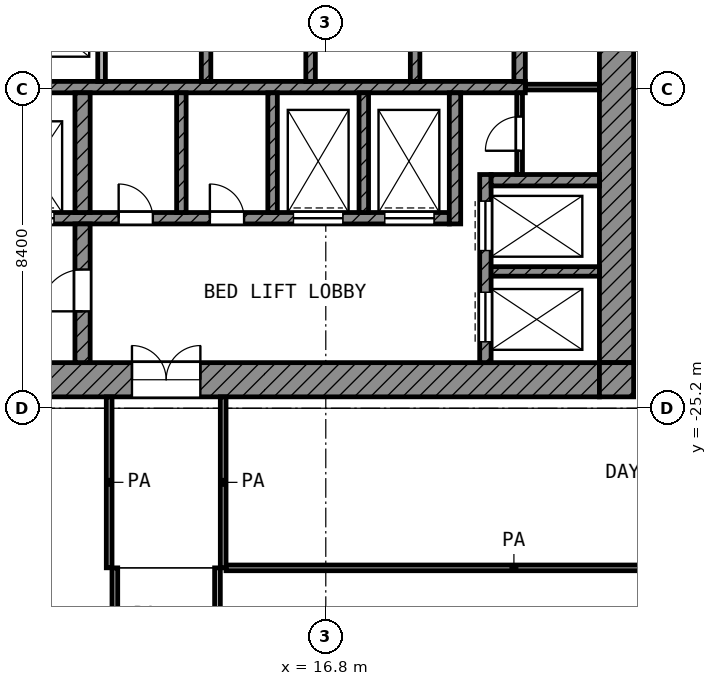
"""IFC4 building model, lengths in metres.
Left out: names, types, materials, properties, quantities, classifications, styles, units other than length and angle.
Written with IfcOpenShell. Run it as: python <this file> out.ifc"""

import sys

from ifc_helpers import new_model, si_unit, direction, frame, frame_2d, origin, place, context, subcontext, project, spatial, rectangle, extrude, element, fill, save


model = new_model("IFC4")
c1 = context("Model", 3, precision=1e-05, world=origin(), true_north=direction((0.0, 1.0)))
c2 = subcontext(c1, "Body", "Model", "MODEL_VIEW")
j1 = project(units=[si_unit("LENGTHUNIT", "METRE"), si_unit("PLANEANGLEUNIT", "RADIAN")], contexts=[c1])
p1 = place(None, origin())
s1 = spatial("IfcSite", under=j1, at=p1, CompositionType="ELEMENT")
p2 = place(p1, origin())
s2 = spatial("IfcBuilding", under=s1, at=p2, CompositionType="ELEMENT")
p3 = place(p2, frame((0.0, 0.0, 196.2)))
s3 = spatial("IfcBuildingStorey", under=s2, at=p3, CompositionType="ELEMENT", Elevation=196.2)
p4 = place(p3, frame((24.45, -24.0, 0.0), z_axis=(0.0, 0.0, 1.0), x_axis=(0.0, 1.0, 0.0)))
e1 = element("IfcWall", 1, at=p4, inside=s3, PredefinedType="SHEAR", context=c2, shape_type="SweptSolid", body=[
    extrude(rectangle(XDim=18.6, YDim=0.9, at=frame_2d((9.3, 0.0))), origin(), (0.0, 0.0, 1.0), 3.6),
])
p5 = place(p4, frame((10.5, 0.0, 0.0)))
e2 = element("IfcOpeningElement", 2, at=p5, cuts=e1, PredefinedType="OPENING", context=c2, shape_type="SweptSolid", body=[
    extrude(rectangle(XDim=1.8, YDim=2.1, at=frame_2d((0.9, 1.05))), frame((0.0, 0.46, 0.0), z_axis=(0.0, -1.0, 0.0), x_axis=(1.0, 0.0, 0.0)), (0.0, 0.0, 1.0), 0.92),
])
p6 = place(p3, frame((5.4, -24.45, 0.0), z_axis=(0.0, 0.0, 1.0), x_axis=(1.0, 0.0, 0.0)))
e3 = element("IfcWall", 3, at=p6, inside=s3, PredefinedType="SHEAR", context=c2, shape_type="SweptSolid", body=[
    extrude(rectangle(XDim=18.6, YDim=0.9, at=frame_2d((9.3, 0.0))), origin(), (0.0, 0.0, 1.0), 3.6),
])
p7 = place(p6, frame((6.3, 0.0, 0.0)))
e4 = element("IfcOpeningElement", 4, at=p7, cuts=e3, PredefinedType="OPENING", context=c2, shape_type="SweptSolid", body=[
    extrude(rectangle(XDim=1.8, YDim=2.1, at=frame_2d((0.9, 1.05))), frame((0.0, 0.46, 0.0), z_axis=(0.0, -1.0, 0.0), x_axis=(1.0, 0.0, 0.0)), (0.0, 0.0, 1.0), 0.92),
])
p8 = place(p3, frame((24.45, -24.9, 0.0), z_axis=(0.0, 0.0, 1.0), x_axis=(0.0, 1.0, 0.0)))
e5 = element("IfcWall", 5, at=p8, inside=s3, PredefinedType="SHEAR", context=c2, shape_type="SweptSolid", body=[
    extrude(rectangle(XDim=0.9, YDim=0.9, at=frame_2d((0.45, 0.0))), origin(), (0.0, 0.0, 1.0), 3.6),
])
p9 = place(p3, frame((5.4, -16.75, 0.0), z_axis=(0.0, 0.0, 1.0), x_axis=(1.0, 0.0, 0.0)))
e6 = element("IfcWall", 6, at=p9, inside=s3, PredefinedType="SHEAR", context=c2, shape_type="SweptSolid", body=[
    extrude(rectangle(XDim=16.65, YDim=0.3, at=frame_2d((8.325, 0.0))), origin(), (0.0, 0.0, 1.0), 3.6),
])
p10 = place(p3, frame((5.4, -20.2, 0.0), z_axis=(0.0, 0.0, 1.0), x_axis=(1.0, 0.0, 0.0)))
e7 = element("IfcWall", 7, at=p10, inside=s3, PredefinedType="SHEAR", context=c2, shape_type="SweptSolid", body=[
    extrude(rectangle(XDim=14.65, YDim=0.3, at=frame_2d((7.325, 0.0))), origin(), (0.0, 0.0, 1.0), 3.6),
])
p11 = place(p10, frame((10.55, 0.0, 0.0)))
e8 = element("IfcOpeningElement", 8, at=p11, cuts=e7, PredefinedType="OPENING", context=c2, shape_type="SweptSolid", body=[
    extrude(rectangle(XDim=1.3, YDim=2.1, at=frame_2d((0.65, 1.05))), frame((0.0, 0.16, 0.0), z_axis=(0.0, -1.0, 0.0), x_axis=(1.0, 0.0, 0.0)), (0.0, 0.0, 1.0), 0.32),
])
p12 = place(p10, frame((12.95, 0.0, 0.0)))
e9 = element("IfcOpeningElement", 9, at=p12, cuts=e7, PredefinedType="OPENING", context=c2, shape_type="SweptSolid", body=[
    extrude(rectangle(XDim=1.3, YDim=2.1, at=frame_2d((0.65, 1.05))), frame((0.0, 0.16, 0.0), z_axis=(0.0, -1.0, 0.0), x_axis=(1.0, 0.0, 0.0)), (0.0, 0.0, 1.0), 0.32),
])
p13 = place(p10, frame((0.55, 0.0, 0.0)))
e10 = element("IfcOpeningElement", 10, at=p13, cuts=e7, PredefinedType="OPENING", context=c2, shape_type="SweptSolid", body=[
    extrude(rectangle(XDim=1.3, YDim=2.1, at=frame_2d((0.65, 1.05))), frame((0.0, 0.16, 0.0), z_axis=(0.0, -1.0, 0.0), x_axis=(1.0, 0.0, 0.0)), (0.0, 0.0, 1.0), 0.32),
])
p14 = place(p10, frame((2.95, 0.0, 0.0)))
e11 = element("IfcOpeningElement", 11, at=p14, cuts=e7, PredefinedType="OPENING", context=c2, shape_type="SweptSolid", body=[
    extrude(rectangle(XDim=1.3, YDim=2.1, at=frame_2d((0.65, 1.05))), frame((0.0, 0.16, 0.0), z_axis=(0.0, -1.0, 0.0), x_axis=(1.0, 0.0, 0.0)), (0.0, 0.0, 1.0), 0.32),
])
p15 = place(p10, frame((5.95, 0.0, 0.0)))
e12 = element("IfcOpeningElement", 12, at=p15, cuts=e7, PredefinedType="OPENING", context=c2, shape_type="SweptSolid", body=[
    extrude(rectangle(XDim=0.9, YDim=2.1, at=frame_2d((0.45, 1.05))), frame((0.0, 0.16, 0.0), z_axis=(0.0, -1.0, 0.0), x_axis=(1.0, 0.0, 0.0)), (0.0, 0.0, 1.0), 0.32),
])
p16 = place(p10, frame((8.35, 0.0, 0.0)))
e13 = element("IfcOpeningElement", 13, at=p16, cuts=e7, PredefinedType="OPENING", context=c2, shape_type="SweptSolid", body=[
    extrude(rectangle(XDim=0.9, YDim=2.1, at=frame_2d((0.45, 1.05))), frame((0.0, 0.16, 0.0), z_axis=(0.0, -1.0, 0.0), x_axis=(1.0, 0.0, 0.0)), (0.0, 0.0, 1.0), 0.32),
])
p17 = place(p3, frame((10.4, -24.0, 0.0), z_axis=(0.0, 0.0, 1.0), x_axis=(0.0, 1.0, 0.0)))
e14 = element("IfcWall", 14, at=p17, inside=s3, PredefinedType="SHEAR", context=c2, shape_type="SweptSolid", body=[
    extrude(rectangle(XDim=3.65, YDim=0.4, at=frame_2d((1.825, 0.0))), origin(), (0.0, 0.0, 1.0), 3.6),
])
p18 = place(p17, frame((1.35, 0.0, 0.0)))
e15 = element("IfcOpeningElement", 15, at=p18, cuts=e14, PredefinedType="OPENING", context=c2, shape_type="SweptSolid", body=[
    extrude(rectangle(XDim=1.1, YDim=2.1, at=frame_2d((0.55, 1.05))), frame((0.0, 0.21, 0.0), z_axis=(0.0, -1.0, 0.0), x_axis=(1.0, 0.0, 0.0)), (0.0, 0.0, 1.0), 0.42),
])
p19 = place(p3, frame((10.4, -20.05, 0.0), z_axis=(0.0, 0.0, 1.0), x_axis=(0.0, 1.0, 0.0)))
e16 = element("IfcWall", 16, at=p19, inside=s3, PredefinedType="SHEAR", context=c2, shape_type="SweptSolid", body=[
    extrude(rectangle(XDim=3.15, YDim=0.4, at=frame_2d((1.575, 0.0))), origin(), (0.0, 0.0, 1.0), 3.6),
])
p20 = place(p3, frame((20.2, -20.35, 0.0), z_axis=(0.0, 0.0, 1.0), x_axis=(0.0, 1.0, 0.0)))
e17 = element("IfcWall", 17, at=p20, inside=s3, PredefinedType="SHEAR", context=c2, shape_type="SweptSolid", body=[
    extrude(rectangle(XDim=3.45, YDim=0.3, at=frame_2d((1.725, 0.0))), origin(), (0.0, 0.0, 1.0), 3.6),
])
p21 = place(p3, frame((21.9, -16.6, 0.0), z_axis=(0.0, 0.0, 1.0), x_axis=(0.0, 1.0, 0.0)))
e18 = element("IfcWall", 18, at=p21, inside=s3, PredefinedType="SHEAR", context=c2, shape_type="SweptSolid", body=[
    extrude(rectangle(XDim=2.35, YDim=0.3, at=frame_2d((1.175, 0.0))), origin(), (0.0, 0.0, 1.0), 3.6),
])
p22 = place(p3, frame((21.15, -19.2, 0.0), z_axis=(0.0, 0.0, 1.0), x_axis=(1.0, 0.0, 0.0)))
e19 = element("IfcWall", 19, at=p22, inside=s3, PredefinedType="SHEAR", context=c2, shape_type="SweptSolid", body=[
    extrude(rectangle(XDim=2.85, YDim=0.3, at=frame_2d((1.425, 0.0))), origin(), (0.0, 0.0, 1.0), 3.6),
])
p23 = place(p3, frame((21.0, -24.0, 0.0), z_axis=(0.0, 0.0, 1.0), x_axis=(0.0, 1.0, 0.0)))
e20 = element("IfcWall", 20, at=p23, inside=s3, PredefinedType="SHEAR", context=c2, shape_type="SweptSolid", body=[
    extrude(rectangle(XDim=4.95, YDim=0.3, at=frame_2d((2.475, 0.0))), origin(), (0.0, 0.0, 1.0), 3.6),
])
p24 = place(p23, frame((2.95, 0.0, 0.0)))
e21 = element("IfcOpeningElement", 21, at=p24, cuts=e20, PredefinedType="OPENING", context=c2, shape_type="SweptSolid", body=[
    extrude(rectangle(XDim=1.3, YDim=2.1, at=frame_2d((0.65, 1.05))), frame((0.0, 0.16, 0.0), z_axis=(0.0, -1.0, 0.0), x_axis=(1.0, 0.0, 0.0)), (0.0, 0.0, 1.0), 0.32),
])
p25 = place(p23, frame((0.55, 0.0, 0.0)))
e22 = element("IfcOpeningElement", 22, at=p25, cuts=e20, PredefinedType="OPENING", context=c2, shape_type="SweptSolid", body=[
    extrude(rectangle(XDim=1.3, YDim=2.1, at=frame_2d((0.65, 1.05))), frame((0.0, 0.16, 0.0), z_axis=(0.0, -1.0, 0.0), x_axis=(1.0, 0.0, 0.0)), (0.0, 0.0, 1.0), 0.32),
])
p26 = place(p3, frame((21.15, -21.6, 0.0), z_axis=(0.0, 0.0, 1.0), x_axis=(1.0, 0.0, 0.0)))
e23 = element("IfcWall", 23, at=p26, inside=s3, PredefinedType="SHEAR", context=c2, shape_type="SweptSolid", body=[
    extrude(rectangle(XDim=2.85, YDim=0.25, at=frame_2d((1.425, 0.0))), origin(), (0.0, 0.0, 1.0), 3.6),
])
for number, where, z_axis, x_axis in (
    (24, (13.0, -20.05, 0.0), (0.0, 0.0, 1.0), (0.0, 1.0, 0.0)),
    (25, (15.4, -20.05, 0.0), (0.0, 0.0, 1.0), (0.0, 1.0, 0.0)),
    (26, (17.8, -20.05, 0.0), (0.0, 0.0, 1.0), (0.0, 1.0, 0.0)),
):
    element("IfcWall", number, at=place(p3, frame(where, z_axis=z_axis, x_axis=x_axis)), inside=s3, PredefinedType="SHEAR", context=c2, shape_type="SweptSolid", body=[
        extrude(rectangle(XDim=3.15, YDim=0.25, at=frame_2d((1.575, 0.0))), origin(), (0.0, 0.0, 1.0), 3.6),
    ])
p27 = place(p3, frame((10.9, -16.6, 0.0), z_axis=(0.0, 0.0, 1.0), x_axis=(0.0, 1.0, 0.0)))
e27 = element("IfcWall", 27, at=p27, inside=s3, PredefinedType="PARTITIONING", context=c2, shape_type="SweptSolid", body=[
    extrude(rectangle(XDim=2.35, YDim=0.2, at=frame_2d((1.175, 0.0))), origin(), (0.0, 0.0, 1.0), 3.6),
])
for number, where, z_axis, x_axis in (
    (28, (13.65, -16.6, 0.0), (0.0, 0.0, 1.0), (0.0, 1.0, 0.0)),
    (29, (16.4, -16.6, 0.0), (0.0, 0.0, 1.0), (0.0, 1.0, 0.0)),
    (30, (19.15, -16.6, 0.0), (0.0, 0.0, 1.0), (0.0, 1.0, 0.0)),
):
    element("IfcWall", number, at=place(p3, frame(where, z_axis=z_axis, x_axis=x_axis)), inside=s3, PredefinedType="SHEAR", context=c2, shape_type="SweptSolid", body=[
        extrude(rectangle(XDim=2.35, YDim=0.25, at=frame_2d((1.175, 0.0))), origin(), (0.0, 0.0, 1.0), 3.6),
    ])
p28 = place(p3, frame((21.9, -19.05, 0.0), z_axis=(0.0, 0.0, 1.0), x_axis=(0.0, 1.0, 0.0)))
e31 = element("IfcWall", 31, at=p28, inside=s3, PredefinedType="PARTITIONING", context=c2, shape_type="SweptSolid", body=[
    extrude(rectangle(XDim=2.15, YDim=0.15, at=frame_2d((1.075, 0.0))), origin(), (0.0, 0.0, 1.0), 3.6),
])
p29 = place(p28, frame((0.625, 0.0, 0.0)))
e32 = element("IfcOpeningElement", 32, at=p29, cuts=e31, PredefinedType="OPENING", context=c2, shape_type="SweptSolid", body=[
    extrude(rectangle(XDim=0.9, YDim=2.1, at=frame_2d((0.45, 1.05))), frame((0.0, 0.085, 0.0), z_axis=(0.0, -1.0, 0.0), x_axis=(1.0, 0.0, 0.0)), (0.0, 0.0, 1.0), 0.17),
])
p30 = place(p3, frame((22.05, -16.75, 0.0), z_axis=(0.0, 0.0, 1.0), x_axis=(1.0, 0.0, 0.0)))
e33 = element("IfcWall", 33, at=p30, inside=s3, PredefinedType="PARTITIONING", context=c2, shape_type="SweptSolid", body=[
    extrude(rectangle(XDim=1.95, YDim=0.15, at=frame_2d((0.975, 0.0))), origin(), (0.0, 0.0, 1.0), 3.6),
])
p31 = place(p3, frame((14.175, -29.4, 0.0), z_axis=(0.0, 0.0, 1.0), x_axis=(1.0, 0.0, 0.0)))
e34 = element("IfcWall", 34, at=p31, inside=s3, PredefinedType="PARTITIONING", context=c2, shape_type="SweptSolid", body=[
    extrude(rectangle(XDim=15.15, YDim=0.15, at=frame_2d((7.575, 0.0))), origin(), (0.0, 0.0, 1.0), 3.6),
])
p32 = place(p3, frame((11.1, -29.398, 0.0), z_axis=(0.0, 0.0, 1.0), x_axis=(0.0, 1.0, 0.0)))
e35 = element("IfcWall", 35, at=p32, inside=s3, PredefinedType="PARTITIONING", context=c2, shape_type="SweptSolid", body=[
    extrude(rectangle(XDim=4.498, YDim=0.15, at=frame_2d((2.249, 0.0))), origin(), (0.0, 0.0, 1.0), 3.6),
])
p33 = place(p3, frame((11.25, -31.857, 0.0), z_axis=(0.0, 0.0, 1.0), x_axis=(0.0, 1.0, 0.0)))
e36 = element("IfcWall", 36, at=p33, inside=s3, PredefinedType="PARTITIONING", context=c2, shape_type="SweptSolid", body=[
    extrude(rectangle(XDim=2.457, YDim=0.15, at=frame_2d((1.229, 0.0))), origin(), (0.0, 0.0, 1.0), 3.6),
])
p34 = place(p3, frame((13.95, -54.52, 0.0), z_axis=(0.0, 0.0, 1.0), x_axis=(0.0, 1.0, 0.0)))
e37 = element("IfcWall", 37, at=p34, inside=s3, PredefinedType="PARTITIONING", context=c2, shape_type="SweptSolid", body=[
    extrude(rectangle(XDim=25.12, YDim=0.15, at=frame_2d((12.56, 0.0))), origin(), (0.0, 0.0, 1.0), 3.6),
])
p35 = place(p34, frame((20.17, 0.0, 0.0)))
e38 = element("IfcOpeningElement", 38, at=p35, cuts=e37, PredefinedType="OPENING", context=c2, shape_type="SweptSolid", body=[
    extrude(rectangle(XDim=1.2, YDim=2.1, at=frame_2d((0.6, 1.05))), frame((0.0, 0.085, 0.0), z_axis=(0.0, -1.0, 0.0), x_axis=(1.0, 0.0, 0.0)), (0.0, 0.0, 1.0), 0.17),
])
p36 = place(p34, frame((13.97, 0.0, 0.0)))
e39 = element("IfcOpeningElement", 39, at=p36, cuts=e37, PredefinedType="OPENING", context=c2, shape_type="SweptSolid", body=[
    extrude(rectangle(XDim=1.0, YDim=2.1, at=frame_2d((0.5, 1.05))), frame((0.0, 0.085, 0.0), z_axis=(0.0, -1.0, 0.0), x_axis=(1.0, 0.0, 0.0)), (0.0, 0.0, 1.0), 0.17),
])
p37 = place(p34, frame((11.22, 0.0, 0.0)))
e40 = element("IfcOpeningElement", 40, at=p37, cuts=e37, PredefinedType="OPENING", context=c2, shape_type="SweptSolid", body=[
    extrude(rectangle(XDim=1.1, YDim=2.1, at=frame_2d((0.55, 1.05))), frame((0.0, 0.085, 0.0), z_axis=(0.0, -1.0, 0.0), x_axis=(1.0, 0.0, 0.0)), (0.0, 0.0, 1.0), 0.17),
])
p38 = place(p34, frame((3.67, 0.0, 0.0)))
e41 = element("IfcOpeningElement", 41, at=p38, cuts=e37, PredefinedType="OPENING", context=c2, shape_type="SweptSolid", body=[
    extrude(rectangle(XDim=1.5, YDim=2.1, at=frame_2d((0.75, 1.05))), frame((0.0, 0.085, 0.0), z_axis=(0.0, -1.0, 0.0), x_axis=(1.0, 0.0, 0.0)), (0.0, 0.0, 1.0), 0.17),
])
p39 = place(p3, frame((14.1, -29.4, 0.0), z_axis=(0.0, 0.0, 1.0), x_axis=(0.0, 1.0, 0.0)))
e42 = element("IfcWall", 42, at=p39, inside=s3, PredefinedType="PARTITIONING", context=c2, shape_type="SweptSolid", body=[
    extrude(rectangle(XDim=4.5, YDim=0.15, at=frame_2d((2.25, 0.0))), origin(), (0.0, 0.0, 1.0), 3.6),
])
p40 = place(p24, origin())
e43 = element("IfcDoor", 43, at=p40, inside=s3, OperationType="DOUBLE_DOOR_SLIDING", PredefinedType="DOOR", context=c2, shape_type="SweptSolid", body=[
    extrude(rectangle(XDim=1.3, YDim=2.1, at=frame_2d((0.65, 1.05))), frame((0.0, 0.025, 0.0), z_axis=(0.0, -1.0, 0.0), x_axis=(1.0, 0.0, 0.0)), (0.0, 0.0, 1.0), 0.05),
])
fill(e21, e43)
p41 = place(p25, origin())
e44 = element("IfcDoor", 44, at=p41, inside=s3, OperationType="DOUBLE_DOOR_SLIDING", PredefinedType="DOOR", context=c2, shape_type="SweptSolid", body=[
    extrude(rectangle(XDim=1.3, YDim=2.1, at=frame_2d((0.65, 1.05))), frame((0.0, 0.025, 0.0), z_axis=(0.0, -1.0, 0.0), x_axis=(1.0, 0.0, 0.0)), (0.0, 0.0, 1.0), 0.05),
])
fill(e22, e44)
p42 = place(p11, origin())
e45 = element("IfcDoor", 45, at=p42, inside=s3, OperationType="DOUBLE_DOOR_SLIDING", PredefinedType="DOOR", context=c2, shape_type="SweptSolid", body=[
    extrude(rectangle(XDim=1.3, YDim=2.1, at=frame_2d((0.65, 1.05))), frame((0.0, 0.025, 0.0), z_axis=(0.0, -1.0, 0.0), x_axis=(1.0, 0.0, 0.0)), (0.0, 0.0, 1.0), 0.05),
])
fill(e8, e45)
p43 = place(p12, origin())
e46 = element("IfcDoor", 46, at=p43, inside=s3, OperationType="DOUBLE_DOOR_SLIDING", PredefinedType="DOOR", context=c2, shape_type="SweptSolid", body=[
    extrude(rectangle(XDim=1.3, YDim=2.1, at=frame_2d((0.65, 1.05))), frame((0.0, 0.025, 0.0), z_axis=(0.0, -1.0, 0.0), x_axis=(1.0, 0.0, 0.0)), (0.0, 0.0, 1.0), 0.05),
])
fill(e9, e46)
p44 = place(p14, origin())
e47 = element("IfcDoor", 47, at=p44, inside=s3, OperationType="DOUBLE_DOOR_SLIDING", PredefinedType="DOOR", context=c2, shape_type="SweptSolid", body=[
    extrude(rectangle(XDim=1.3, YDim=2.1, at=frame_2d((0.65, 1.05))), frame((0.0, 0.025, 0.0), z_axis=(0.0, -1.0, 0.0), x_axis=(1.0, 0.0, 0.0)), (0.0, 0.0, 1.0), 0.05),
])
fill(e11, e47)
p45 = place(p18, origin())
e48 = element("IfcDoor", 48, at=p45, inside=s3, OperationType="SINGLE_SWING_LEFT", PredefinedType="DOOR", context=c2, shape_type="SweptSolid", body=[
    extrude(rectangle(XDim=1.1, YDim=2.1, at=frame_2d((0.55, 1.05))), frame((0.0, 0.025, 0.0), z_axis=(0.0, -1.0, 0.0), x_axis=(1.0, 0.0, 0.0)), (0.0, 0.0, 1.0), 0.05),
])
fill(e15, e48)
p46 = place(p7, origin())
e49 = element("IfcDoor", 49, at=p46, inside=s3, OperationType="DOUBLE_DOOR_SINGLE_SWING", PredefinedType="DOOR", context=c2, shape_type="SweptSolid", body=[
    extrude(rectangle(XDim=1.8, YDim=2.1, at=frame_2d((0.9, 1.05))), frame((0.0, 0.025, 0.0), z_axis=(0.0, -1.0, 0.0), x_axis=(1.0, 0.0, 0.0)), (0.0, 0.0, 1.0), 0.05),
])
fill(e4, e49)
p47 = place(p29, origin())
e50 = element("IfcDoor", 50, at=p47, inside=s3, OperationType="SINGLE_SWING_LEFT", PredefinedType="DOOR", context=c2, shape_type="SweptSolid", body=[
    extrude(rectangle(XDim=0.9, YDim=2.1, at=frame_2d((0.45, 1.05))), frame((0.0, 0.025, 0.0), z_axis=(0.0, -1.0, 0.0), x_axis=(1.0, 0.0, 0.0)), (0.0, 0.0, 1.0), 0.05),
])
fill(e32, e50)
p48 = place(p15, origin())
e51 = element("IfcDoor", 51, at=p48, inside=s3, OperationType="SINGLE_SWING_LEFT", PredefinedType="DOOR", context=c2, shape_type="SweptSolid", body=[
    extrude(rectangle(XDim=0.9, YDim=2.1, at=frame_2d((0.45, 1.05))), frame((0.0, 0.025, 0.0), z_axis=(0.0, -1.0, 0.0), x_axis=(1.0, 0.0, 0.0)), (0.0, 0.0, 1.0), 0.05),
])
fill(e12, e51)
p49 = place(p16, origin())
e52 = element("IfcDoor", 52, at=p49, inside=s3, OperationType="SINGLE_SWING_LEFT", PredefinedType="DOOR", context=c2, shape_type="SweptSolid", body=[
    extrude(rectangle(XDim=0.9, YDim=2.1, at=frame_2d((0.45, 1.05))), frame((0.0, 0.025, 0.0), z_axis=(0.0, -1.0, 0.0), x_axis=(1.0, 0.0, 0.0)), (0.0, 0.0, 1.0), 0.05),
])
fill(e13, e52)
save(model, sys.argv[1])
